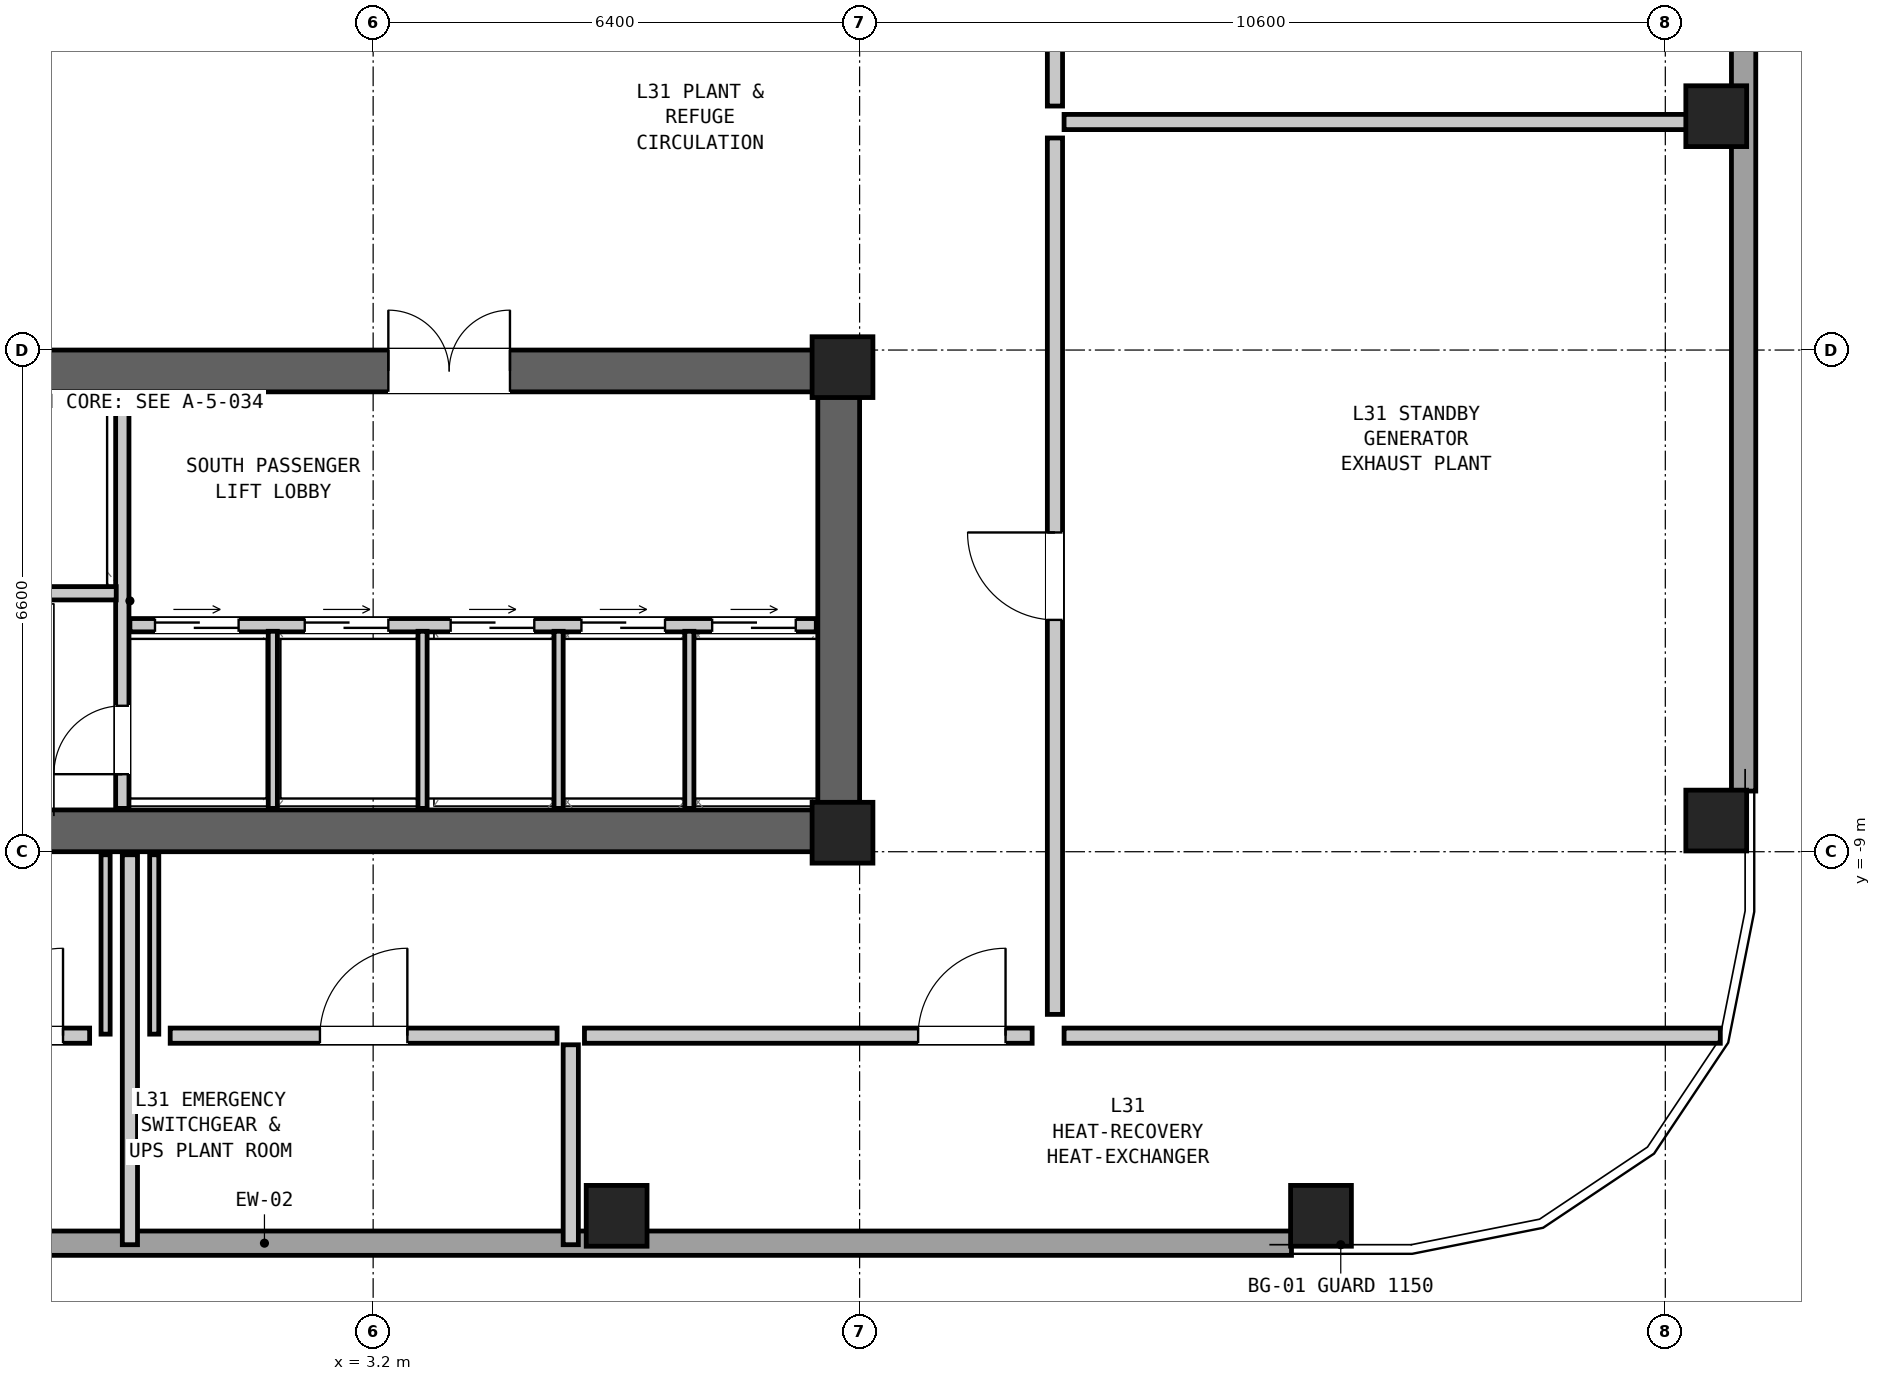
"""IFC4 building model, lengths in metres.
Left out: names, types, materials, properties, quantities, classifications, styles, units other than length and angle.
Written with IfcOpenShell. Run it as: python <this file> out.ifc"""

import sys

from ifc_helpers import new_model, si_unit, direction, frame, frame_2d, origin, origin_2d, place, context, subcontext, project, spatial, rectangle, hollow_rectangle, extrude, element, fill, save


model = new_model("IFC4")
c1 = context("Model", 3, precision=1e-05, world=origin(), true_north=direction((0.0, 1.0)))
c2 = subcontext(c1, "Body", "Model", "MODEL_VIEW")
j1 = project(units=[si_unit("LENGTHUNIT", "METRE"), si_unit("PLANEANGLEUNIT", "RADIAN")], contexts=[c1])
p1 = place(None, origin())
s1 = spatial("IfcSite", under=j1, at=p1, CompositionType="ELEMENT")
p2 = place(p1, origin())
s2 = spatial("IfcBuilding", under=s1, at=p2, CompositionType="ELEMENT")
p3 = place(p2, frame((0.0, 0.0, 108.45)))
s3 = spatial("IfcBuildingStorey", under=s2, at=p3, CompositionType="ELEMENT", Elevation=108.45)
p4 = place(p3, frame((-9.6, -8.725, 0.0), z_axis=(0.0, 0.0, 1.0), x_axis=(1.0, 0.0, 0.0)))
e1 = element("IfcWall", 1, at=p4, inside=s3, PredefinedType="SHEAR", context=c2, shape_type="SweptSolid", body=[
    extrude(rectangle(XDim=19.2, YDim=0.55, at=frame_2d((9.6, 0.0))), origin(), (0.0, 0.0, 1.0), 4.35),
])
p5 = place(p3, frame((-9.6, -2.675, 0.0), z_axis=(0.0, 0.0, 1.0), x_axis=(1.0, 0.0, 0.0)))
e2 = element("IfcWall", 2, at=p5, inside=s3, PredefinedType="SHEAR", context=c2, shape_type="SweptSolid", body=[
    extrude(rectangle(XDim=19.2, YDim=0.55, at=frame_2d((9.6, 0.0))), origin(), (0.0, 0.0, 1.0), 4.35),
])
p6 = place(p5, frame((3.8, 0.0, 0.0)))
e3 = element("IfcOpeningElement", 3, at=p6, cuts=e2, PredefinedType="OPENING", context=c2, shape_type="SweptSolid", body=[
    extrude(rectangle(XDim=1.1, YDim=2.08, at=frame_2d((0.55, 1.04))), frame((0.0, 0.287, 0.0), z_axis=(0.0, -1.0, 0.0), x_axis=(1.0, 0.0, 0.0)), (0.0, 0.0, 1.0), 0.574),
])
p7 = place(p5, frame((13.0, 0.0, 0.0)))
e4 = element("IfcOpeningElement", 4, at=p7, cuts=e2, PredefinedType="OPENING", context=c2, shape_type="SweptSolid", body=[
    extrude(rectangle(XDim=1.6, YDim=2.12, at=frame_2d((0.8, 1.06))), frame((0.0, 0.287, 0.0), z_axis=(0.0, -1.0, 0.0), x_axis=(1.0, 0.0, 0.0)), (0.0, 0.0, 1.0), 0.574),
])
p8 = place(p3, frame((9.325, -9.0, 0.0), z_axis=(0.0, 0.0, 1.0), x_axis=(0.0, 1.0, 0.0)))
e5 = element("IfcWall", 5, at=p8, inside=s3, PredefinedType="SHEAR", context=c2, shape_type="SweptSolid", body=[
    extrude(rectangle(XDim=6.6, YDim=0.55, at=frame_2d((3.3, 0.0))), origin(), (0.0, 0.0, 1.0), 4.35),
])
for number, where, z_axis, x_axis in (
    (6, (6.403, -13.79, 0.0), (0.0, 0.0, 1.0), (1.0, 0.0, 0.0)),
    (7, (15.67, -13.79, 0.0), (0.0, 0.0, 1.0), (1.0, 0.0, 0.0)),
    (8, (20.87, -8.59, 0.0), (0.0, 0.0, 1.0), (0.0, 1.0, 0.0)),
    (9, (20.87, 0.677, 0.0), (0.0, 0.0, 1.0), (0.0, 1.0, 0.0)),
):
    element("IfcColumn", number, at=place(p3, frame(where, z_axis=z_axis, x_axis=x_axis)), inside=s3, PredefinedType="COLUMN", context=c2, shape_type="SweptSolid", body=[
        extrude(hollow_rectangle(XDim=0.8, YDim=0.8, WallThickness=0.05, at=origin_2d()), origin(), (0.0, 0.0, 1.0), 4.35),
    ])
for number, where, z_axis, x_axis in (
    (10, (9.375, -2.625, 0.0), (0.0, 0.0, 1.0), (1.0, 0.0, 0.0)),
    (11, (9.375, -8.75, 0.0), (0.0, 0.0, 1.0), (1.0, 0.0, 0.0)),
):
    element("IfcColumn", number, at=place(p3, frame(where, z_axis=z_axis, x_axis=x_axis)), inside=s3, PredefinedType="COLUMN", context=c2, shape_type="SweptSolid", body=[
        extrude(rectangle(XDim=0.8, YDim=0.8, at=origin_2d()), origin(), (0.0, 0.0, 1.0), 4.35),
    ])
for number, where, z_axis, x_axis in (
    (12, (15.282, -14.15, 0.0), (0.0, 0.0, 1.0), (-1.0, 0.0, 0.0)),
    (13, (21.23, 18.822, 0.0), (0.0, 0.0, 1.0), (0.0, -1.0, 0.0)),
):
    element("IfcWall", number, at=place(p3, frame(where, z_axis=z_axis, x_axis=x_axis)), inside=s3, PredefinedType="SOLIDWALL", context=c2, shape_type="SweptSolid", body=[
        extrude(rectangle(XDim=27.024, YDim=0.32, at=frame_2d((13.512, 0.0))), origin(), (0.0, 0.0, 1.0), 2.31),
    ])
p9 = place(p3, frame((-0.1, -8.43, 0.0), z_axis=(0.0, 0.0, 1.0), x_axis=(0.0, 1.0, 0.0)))
e14 = element("IfcWall", 14, at=p9, inside=s3, PredefinedType="PARTITIONING", context=c2, shape_type="SweptSolid", body=[
    extrude(rectangle(XDim=5.46, YDim=0.175, at=frame_2d((2.73, 0.0))), origin(), (0.0, 0.0, 1.0), 4.13),
])
p10 = place(p9, frame((0.45, 0.0, 0.0)))
e15 = element("IfcOpeningElement", 15, at=p10, cuts=e14, PredefinedType="OPENING", context=c2, shape_type="SweptSolid", body=[
    extrude(rectangle(XDim=0.9, YDim=2.05, at=frame_2d((0.45, 1.025))), frame((0.0, 0.1, 0.0), z_axis=(0.0, -1.0, 0.0), x_axis=(1.0, 0.0, 0.0)), (0.0, 0.0, 1.0), 0.199),
])
p11 = place(p3, frame((-2.15, -5.6, 0.0), z_axis=(0.0, 0.0, 1.0), x_axis=(1.0, 0.0, 0.0)))
e16 = element("IfcWall", 16, at=p11, inside=s3, PredefinedType="PARTITIONING", context=c2, shape_type="SweptSolid", body=[
    extrude(rectangle(XDim=1.97, YDim=0.175, at=frame_2d((0.985, 0.0))), origin(), (0.0, 0.0, 1.0), 4.13),
])
p12 = place(p3, frame((0.0, -6.02, 0.0), z_axis=(0.0, 0.0, 1.0), x_axis=(1.0, 0.0, 0.0)))
e17 = element("IfcWall", 17, at=p12, inside=s3, PredefinedType="PARTITIONING", context=c2, shape_type="SweptSolid", body=[
    extrude(rectangle(XDim=9.03, YDim=0.175, at=frame_2d((4.515, 0.0))), origin(), (0.0, 0.0, 1.0), 4.13),
])
p13 = place(p12, frame((0.33, 0.0, 0.0)))
e18 = element("IfcOpeningElement", 18, at=p13, cuts=e17, PredefinedType="OPENING", context=c2, shape_type="SweptSolid", body=[
    extrude(rectangle(XDim=1.1, YDim=2.06, at=frame_2d((0.55, 1.03))), frame((0.0, 0.1, 0.0), z_axis=(0.0, -1.0, 0.0), x_axis=(1.0, 0.0, 0.0)), (0.0, 0.0, 1.0), 0.199),
])
p14 = place(p12, frame((2.3, 0.0, 0.0)))
e19 = element("IfcOpeningElement", 19, at=p14, cuts=e17, PredefinedType="OPENING", context=c2, shape_type="SweptSolid", body=[
    extrude(rectangle(XDim=1.1, YDim=2.06, at=frame_2d((0.55, 1.03))), frame((0.0, 0.1, 0.0), z_axis=(0.0, -1.0, 0.0), x_axis=(1.0, 0.0, 0.0)), (0.0, 0.0, 1.0), 0.199),
])
p15 = place(p12, frame((4.22, 0.0, 0.0)))
e20 = element("IfcOpeningElement", 20, at=p15, cuts=e17, PredefinedType="OPENING", context=c2, shape_type="SweptSolid", body=[
    extrude(rectangle(XDim=1.1, YDim=2.06, at=frame_2d((0.55, 1.03))), frame((0.0, 0.1, 0.0), z_axis=(0.0, -1.0, 0.0), x_axis=(1.0, 0.0, 0.0)), (0.0, 0.0, 1.0), 0.199),
])
p16 = place(p12, frame((5.94, 0.0, 0.0)))
e21 = element("IfcOpeningElement", 21, at=p16, cuts=e17, PredefinedType="OPENING", context=c2, shape_type="SweptSolid", body=[
    extrude(rectangle(XDim=1.1, YDim=2.06, at=frame_2d((0.55, 1.03))), frame((0.0, 0.1, 0.0), z_axis=(0.0, -1.0, 0.0), x_axis=(1.0, 0.0, 0.0)), (0.0, 0.0, 1.0), 0.199),
])
p17 = place(p12, frame((7.66, 0.0, 0.0)))
e22 = element("IfcOpeningElement", 22, at=p17, cuts=e17, PredefinedType="OPENING", context=c2, shape_type="SweptSolid", body=[
    extrude(rectangle(XDim=1.1, YDim=2.06, at=frame_2d((0.55, 1.03))), frame((0.0, 0.1, 0.0), z_axis=(0.0, -1.0, 0.0), x_axis=(1.0, 0.0, 0.0)), (0.0, 0.0, 1.0), 0.199),
])
for number, where, z_axis, x_axis in (
    (23, (1.88, -8.43, 0.0), (0.0, 0.0, 1.0), (0.0, 1.0, 0.0)),
    (24, (3.85, -8.43, 0.0), (0.0, 0.0, 1.0), (0.0, 1.0, 0.0)),
    (25, (5.64, -8.43, 0.0), (0.0, 0.0, 1.0), (0.0, 1.0, 0.0)),
    (26, (7.36, -8.43, 0.0), (0.0, 0.0, 1.0), (0.0, 1.0, 0.0)),
):
    element("IfcWall", number, at=place(p3, frame(where, z_axis=z_axis, x_axis=x_axis)), inside=s3, PredefinedType="PARTITIONING", context=c2, shape_type="SweptSolid", body=[
        extrude(rectangle(XDim=2.33, YDim=0.12, at=frame_2d((1.165, 0.0))), origin(), (0.0, 0.0, 1.0), 4.13),
    ])
p18 = place(p3, frame((0.0, -14.17, 0.0), z_axis=(0.0, 0.0, 1.0), x_axis=(0.0, 1.0, 0.0)))
e27 = element("IfcWall", 27, at=p18, inside=s3, PredefinedType="PARTITIONING", context=c2, shape_type="SweptSolid", body=[
    extrude(rectangle(XDim=5.13, YDim=0.2, at=frame_2d((2.565, 0.0))), origin(), (0.0, 0.0, 1.0), 2.31),
])
for number, where, z_axis, x_axis in (
    (28, (-0.32, -11.4, 0.0), (0.0, 0.0, 1.0), (0.0, 1.0, 0.0)),
    (29, (0.32, -11.4, 0.0), (0.0, 0.0, 1.0), (0.0, 1.0, 0.0)),
):
    element("IfcWall", number, at=place(p3, frame(where, z_axis=z_axis, x_axis=x_axis)), inside=s3, PredefinedType="PARTITIONING", context=c2, shape_type="SweptSolid", body=[
        extrude(rectangle(XDim=2.36, YDim=0.12, at=frame_2d((1.18, 0.0))), origin(), (0.0, 0.0, 1.0), 2.31),
    ])
p19 = place(p3, frame((-5.62, -11.42, 0.0), z_axis=(0.0, 0.0, 1.0), x_axis=(1.0, 0.0, 0.0)))
e30 = element("IfcWall", 30, at=p19, inside=s3, PredefinedType="PARTITIONING", context=c2, shape_type="SweptSolid", body=[
    extrude(rectangle(XDim=5.09, YDim=0.2, at=frame_2d((2.545, 0.0))), origin(), (0.0, 0.0, 1.0), 4.13),
])
p20 = place(p19, frame((3.59, 0.0, 0.0)))
e31 = element("IfcOpeningElement", 31, at=p20, cuts=e30, PredefinedType="OPENING", context=c2, shape_type="SweptSolid", body=[
    extrude(rectangle(XDim=1.15, YDim=2.1, at=frame_2d((0.575, 1.05))), frame((0.0, 0.112, 0.0), z_axis=(0.0, -1.0, 0.0), x_axis=(1.0, 0.0, 0.0)), (0.0, 0.0, 1.0), 0.224),
])
p21 = place(p3, frame((0.53, -11.42, 0.0), z_axis=(0.0, 0.0, 1.0), x_axis=(1.0, 0.0, 0.0)))
e32 = element("IfcWall", 32, at=p21, inside=s3, PredefinedType="PARTITIONING", context=c2, shape_type="SweptSolid", body=[
    extrude(rectangle(XDim=5.09, YDim=0.2, at=frame_2d((2.545, 0.0))), origin(), (0.0, 0.0, 1.0), 4.13),
])
p22 = place(p21, frame((1.97, 0.0, 0.0)))
e33 = element("IfcOpeningElement", 33, at=p22, cuts=e32, PredefinedType="OPENING", context=c2, shape_type="SweptSolid", body=[
    extrude(rectangle(XDim=1.15, YDim=2.1, at=frame_2d((0.575, 1.05))), frame((0.0, 0.112, 0.0), z_axis=(0.0, -1.0, 0.0), x_axis=(1.0, 0.0, 0.0)), (0.0, 0.0, 1.0), 0.224),
])
p23 = place(p3, frame((5.8, -14.17, 0.0), z_axis=(0.0, 0.0, 1.0), x_axis=(0.0, 1.0, 0.0)))
e34 = element("IfcWall", 34, at=p23, inside=s3, PredefinedType="PARTITIONING", context=c2, shape_type="SweptSolid", body=[
    extrude(rectangle(XDim=2.63, YDim=0.2, at=frame_2d((1.315, 0.0))), origin(), (0.0, 0.0, 1.0), 3.647),
])
p24 = place(p3, frame((5.98, -11.42, 0.0), z_axis=(0.0, 0.0, 1.0), x_axis=(1.0, 0.0, 0.0)))
e35 = element("IfcWall", 35, at=p24, inside=s3, PredefinedType="PARTITIONING", context=c2, shape_type="SweptSolid", body=[
    extrude(rectangle(XDim=5.89, YDim=0.2, at=frame_2d((2.945, 0.0))), origin(), (0.0, 0.0, 1.0), 3.647),
])
p25 = place(p24, frame((4.39, 0.0, 0.0)))
e36 = element("IfcOpeningElement", 36, at=p25, cuts=e35, PredefinedType="OPENING", context=c2, shape_type="SweptSolid", body=[
    extrude(rectangle(XDim=1.15, YDim=2.1, at=frame_2d((0.575, 1.05))), frame((0.0, 0.112, 0.0), z_axis=(0.0, -1.0, 0.0), x_axis=(1.0, 0.0, 0.0)), (0.0, 0.0, 1.0), 0.224),
])
p26 = place(p3, frame((12.29, -11.42, 0.0), z_axis=(0.0, 0.0, 1.0), x_axis=(1.0, 0.0, 0.0)))
e37 = element("IfcWall", 37, at=p26, inside=s3, PredefinedType="PARTITIONING", context=c2, shape_type="SweptSolid", body=[
    extrude(rectangle(XDim=8.634, YDim=0.2, at=frame_2d((4.317, 0.0))), origin(), (0.0, 0.0, 1.0), 2.31),
])
p27 = place(p3, frame((12.29, 0.6, 0.0), z_axis=(0.0, 0.0, 1.0), x_axis=(1.0, 0.0, 0.0)))
e38 = element("IfcWall", 38, at=p27, inside=s3, PredefinedType="PARTITIONING", context=c2, shape_type="SweptSolid", body=[
    extrude(rectangle(XDim=8.96, YDim=0.2, at=frame_2d((4.48, 0.0))), origin(), (0.0, 0.0, 1.0), 2.31),
])
p28 = place(p3, frame((12.17, -11.14, 0.0), z_axis=(0.0, 0.0, 1.0), x_axis=(0.0, 1.0, 0.0)))
e39 = element("IfcWall", 39, at=p28, inside=s3, PredefinedType="PARTITIONING", context=c2, shape_type="SweptSolid", body=[
    extrude(rectangle(XDim=11.53, YDim=0.2, at=frame_2d((5.765, 0.0))), origin(), (0.0, 0.0, 1.0), 4.13),
])
p29 = place(p28, frame((5.19, 0.0, 0.0)))
e40 = element("IfcOpeningElement", 40, at=p29, cuts=e39, PredefinedType="OPENING", context=c2, shape_type="SweptSolid", body=[
    extrude(rectangle(XDim=1.15, YDim=2.1, at=frame_2d((0.575, 1.05))), frame((0.0, 0.112, 0.0), z_axis=(0.0, -1.0, 0.0), x_axis=(1.0, 0.0, 0.0)), (0.0, 0.0, 1.0), 0.224),
])
p30 = place(p3, frame((12.17, 0.81, 0.0), z_axis=(0.0, 0.0, 1.0), x_axis=(0.0, 1.0, 0.0)))
e41 = element("IfcWall", 41, at=p30, inside=s3, PredefinedType="PARTITIONING", context=c2, shape_type="SweptSolid", body=[
    extrude(rectangle(XDim=11.53, YDim=0.2, at=frame_2d((5.765, 0.0))), origin(), (0.0, 0.0, 1.0), 2.11),
])
p31 = place(p30, frame((6.574, 0.0, 0.0)))
e42 = element("IfcOpeningElement", 42, at=p31, cuts=e41, PredefinedType="OPENING", context=c2, shape_type="SweptSolid", body=[
    extrude(rectangle(XDim=0.9, YDim=2.05, at=frame_2d((0.45, 1.025))), frame((0.0, 0.112, 0.0), z_axis=(0.0, -1.0, 0.0), x_axis=(1.0, 0.0, 0.0)), (0.0, 0.0, 1.0), 0.224),
])
p32 = place(p10, origin())
e43 = element("IfcDoor", 43, at=p32, inside=s3, OperationType="SINGLE_SWING_LEFT", PredefinedType="DOOR", context=c2, shape_type="SweptSolid", body=[
    extrude(rectangle(XDim=0.9, YDim=2.05, at=frame_2d((0.45, 1.025))), frame((0.0, 0.025, 0.0), z_axis=(0.0, -1.0, 0.0), x_axis=(1.0, 0.0, 0.0)), (0.0, 0.0, 1.0), 0.05),
])
fill(e15, e43)
p33 = place(p13, origin())
e44 = element("IfcDoor", 44, at=p33, inside=s3, OperationType="DOUBLE_DOOR_SLIDING", PredefinedType="DOOR", context=c2, shape_type="SweptSolid", body=[
    extrude(rectangle(XDim=1.1, YDim=2.06, at=frame_2d((0.55, 1.03))), frame((0.0, 0.025, 0.0), z_axis=(0.0, -1.0, 0.0), x_axis=(1.0, 0.0, 0.0)), (0.0, 0.0, 1.0), 0.05),
])
fill(e18, e44)
p34 = place(p14, origin())
e45 = element("IfcDoor", 45, at=p34, inside=s3, OperationType="DOUBLE_DOOR_SLIDING", PredefinedType="DOOR", context=c2, shape_type="SweptSolid", body=[
    extrude(rectangle(XDim=1.1, YDim=2.06, at=frame_2d((0.55, 1.03))), frame((0.0, 0.025, 0.0), z_axis=(0.0, -1.0, 0.0), x_axis=(1.0, 0.0, 0.0)), (0.0, 0.0, 1.0), 0.05),
])
fill(e19, e45)
p35 = place(p7, origin())
e46 = element("IfcDoor", 46, at=p35, inside=s3, OperationType="DOUBLE_DOOR_SINGLE_SWING", PredefinedType="DOOR", context=c2, shape_type="SweptSolid", body=[
    extrude(rectangle(XDim=1.6, YDim=2.12, at=frame_2d((0.8, 1.06))), frame((0.0, 0.025, 0.0), z_axis=(0.0, -1.0, 0.0), x_axis=(1.0, 0.0, 0.0)), (0.0, 0.0, 1.0), 0.05),
])
fill(e4, e46)
p36 = place(p20, origin())
e47 = element("IfcDoor", 47, at=p36, inside=s3, OperationType="SINGLE_SWING_RIGHT", PredefinedType="DOOR", context=c2, shape_type="SweptSolid", body=[
    extrude(rectangle(XDim=1.15, YDim=2.1, at=frame_2d((0.575, 1.05))), frame((0.0, 0.025, 0.0), z_axis=(0.0, -1.0, 0.0), x_axis=(1.0, 0.0, 0.0)), (0.0, 0.0, 1.0), 0.05),
])
fill(e31, e47)
p37 = place(p22, origin())
e48 = element("IfcDoor", 48, at=p37, inside=s3, OperationType="SINGLE_SWING_RIGHT", PredefinedType="DOOR", context=c2, shape_type="SweptSolid", body=[
    extrude(rectangle(XDim=1.15, YDim=2.1, at=frame_2d((0.575, 1.05))), frame((0.0, 0.025, 0.0), z_axis=(0.0, -1.0, 0.0), x_axis=(1.0, 0.0, 0.0)), (0.0, 0.0, 1.0), 0.05),
])
fill(e33, e48)
p38 = place(p25, origin())
e49 = element("IfcDoor", 49, at=p38, inside=s3, OperationType="SINGLE_SWING_RIGHT", PredefinedType="DOOR", context=c2, shape_type="SweptSolid", body=[
    extrude(rectangle(XDim=1.15, YDim=2.1, at=frame_2d((0.575, 1.05))), frame((0.0, 0.025, 0.0), z_axis=(0.0, -1.0, 0.0), x_axis=(1.0, 0.0, 0.0)), (0.0, 0.0, 1.0), 0.05),
])
fill(e36, e49)
p39 = place(p29, origin())
e50 = element("IfcDoor", 50, at=p39, inside=s3, OperationType="SINGLE_SWING_RIGHT", PredefinedType="DOOR", context=c2, shape_type="SweptSolid", body=[
    extrude(rectangle(XDim=1.15, YDim=2.1, at=frame_2d((0.575, 1.05))), frame((0.0, 0.025, 0.0), z_axis=(0.0, -1.0, 0.0), x_axis=(1.0, 0.0, 0.0)), (0.0, 0.0, 1.0), 0.05),
])
fill(e40, e50)
p40 = place(p15, origin())
e51 = element("IfcDoor", 51, at=p40, inside=s3, OperationType="DOUBLE_DOOR_SLIDING", PredefinedType="DOOR", context=c2, shape_type="SweptSolid", body=[
    extrude(rectangle(XDim=1.1, YDim=2.06, at=frame_2d((0.55, 1.03))), frame((0.0, 0.025, 0.0), z_axis=(0.0, -1.0, 0.0), x_axis=(1.0, 0.0, 0.0)), (0.0, 0.0, 1.0), 0.05),
])
fill(e20, e51)
p41 = place(p16, origin())
e52 = element("IfcDoor", 52, at=p41, inside=s3, OperationType="DOUBLE_DOOR_SLIDING", PredefinedType="DOOR", context=c2, shape_type="SweptSolid", body=[
    extrude(rectangle(XDim=1.1, YDim=2.06, at=frame_2d((0.55, 1.03))), frame((0.0, 0.025, 0.0), z_axis=(0.0, -1.0, 0.0), x_axis=(1.0, 0.0, 0.0)), (0.0, 0.0, 1.0), 0.05),
])
fill(e21, e52)
p42 = place(p17, origin())
e53 = element("IfcDoor", 53, at=p42, inside=s3, OperationType="DOUBLE_DOOR_SLIDING", PredefinedType="DOOR", context=c2, shape_type="SweptSolid", body=[
    extrude(rectangle(XDim=1.1, YDim=2.06, at=frame_2d((0.55, 1.03))), frame((0.0, 0.025, 0.0), z_axis=(0.0, -1.0, 0.0), x_axis=(1.0, 0.0, 0.0)), (0.0, 0.0, 1.0), 0.05),
])
fill(e22, e53)
save(model, sys.argv[1])
